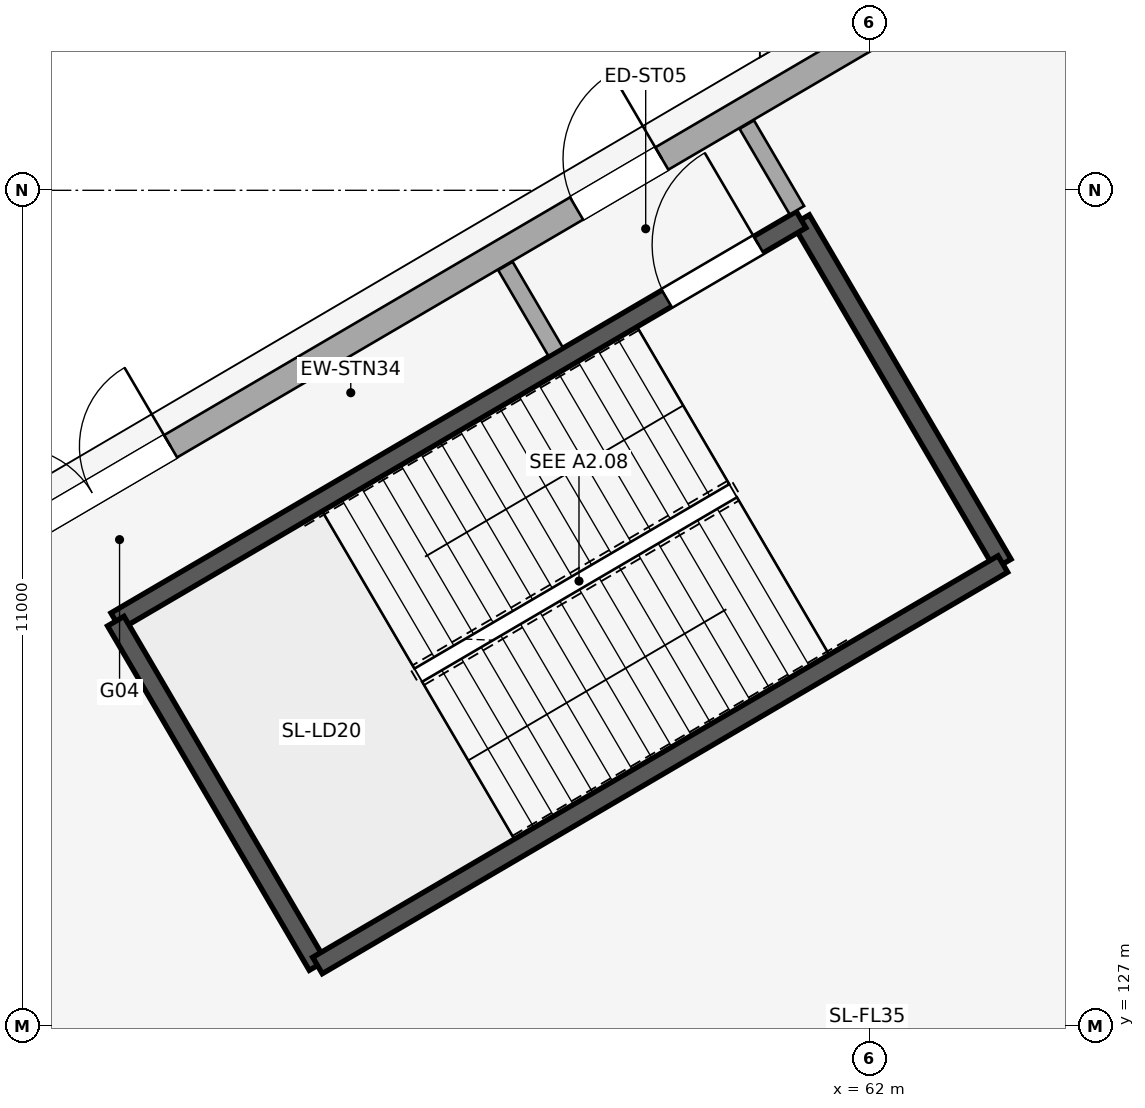
"""IFC4 building model, lengths in metres.
Left out: names, types, materials, properties, quantities, classifications, styles, units other than length and angle.
Written with IfcOpenShell. Run it as: python <this file> out.ifc"""

import sys

from ifc_helpers import new_model, si_unit, direction, frame, frame_2d, origin, place, context, subcontext, project, spatial, rectangle, extrude, element, fill, save


model = new_model("IFC4")
c1 = context("Model", 3, precision=1e-05, world=origin(), true_north=direction((0.0, 1.0)))
c2 = subcontext(c1, "Body", "Model", "MODEL_VIEW")
j1 = project(units=[si_unit("LENGTHUNIT", "METRE"), si_unit("PLANEANGLEUNIT", "RADIAN")], contexts=[c1])
p1 = place(None, origin())
s1 = spatial("IfcSite", under=j1, at=p1, CompositionType="ELEMENT")
p2 = place(p1, origin())
s2 = spatial("IfcBuilding", under=s1, at=p2, CompositionType="ELEMENT")
p3 = place(p2, origin())
s3 = spatial("IfcBuildingStorey", under=s2, at=p3, CompositionType="ELEMENT", Elevation=0.0)
p4 = place(p3, frame((64.103, 141.255, 0.0), z_axis=(0.0, 0.0, 1.0), x_axis=(-0.862843632099, -0.505470935413, 0.0)))
e1 = element("IfcWall", 1, at=p4, inside=s3, PredefinedType="STANDARD", context=c2, shape_type="SweptSolid", body=[
    extrude(rectangle(XDim=21.403, YDim=0.34, at=frame_2d((10.701, 0.0))), origin(), (0.0, 0.0, 1.0), 3.85),
])
p5 = place(p4, frame((5.613, 0.0, 0.0)))
e2 = element("IfcOpeningElement", 2, at=p5, cuts=e1, PredefinedType="OPENING", context=c2, shape_type="SweptSolid", body=[
    extrude(rectangle(XDim=1.3, YDim=2.2, at=frame_2d((0.65, 1.1))), frame((0.0, 0.18, 0.0), z_axis=(0.0, -1.0, 0.0), x_axis=(1.0, 0.0, 0.0)), (0.0, 0.0, 1.0), 0.36),
])
p6 = place(p4, frame((13.103, 0.0, 0.0)))
e3 = element("IfcOpeningElement", 3, at=p6, cuts=e1, PredefinedType="OPENING", context=c2, shape_type="SweptSolid", body=[
    extrude(rectangle(XDim=2.4, YDim=2.4, at=frame_2d((1.2, 1.2))), frame((0.0, 0.18, 0.0), z_axis=(0.0, -1.0, 0.0), x_axis=(1.0, 0.0, 0.0)), (0.0, 0.0, 1.0), 0.36),
])
p7 = place(p3, frame((63.747, 133.084, 0.0), z_axis=(0.0, 0.0, 1.0), x_axis=(-0.505460490551, 0.862849750821, 0.0)))
e4 = element("IfcWall", 4, at=p7, inside=s3, PredefinedType="SHEAR", context=c2, shape_type="SweptSolid", body=[
    extrude(rectangle(XDim=5.25, YDim=0.25, at=frame_2d((2.625, 0.0))), origin(), (0.0, 0.0, 1.0), 5.1),
])
p8 = place(p3, frame((61.093, 137.614, 0.0), z_axis=(0.0, 0.0, 1.0), x_axis=(-0.862854686184, -0.505452065513, 0.0)))
e5 = element("IfcWall", 5, at=p8, inside=s3, PredefinedType="SHEAR", context=c2, shape_type="SweptSolid", body=[
    extrude(rectangle(XDim=10.45, YDim=0.25, at=frame_2d((5.225, 0.0))), origin(), (0.0, 0.0, 1.0), 5.1),
])
p9 = place(p8, frame((0.65, 0.0, 0.0)))
e6 = element("IfcOpeningElement", 6, at=p9, cuts=e5, PredefinedType="OPENING", context=c2, shape_type="SweptSolid", body=[
    extrude(rectangle(XDim=1.4, YDim=2.2, at=frame_2d((0.7, 1.1))), frame((0.0, 0.135, 0.0), z_axis=(0.0, -1.0, 0.0), x_axis=(1.0, 0.0, 0.0)), (0.0, 0.0, 1.0), 0.27),
])
p10 = place(p3, frame((52.076, 132.332, 0.0), z_axis=(0.0, 0.0, 1.0), x_axis=(0.505474830399, -0.862841350327, 0.0)))
e7 = element("IfcWall", 7, at=p10, inside=s3, PredefinedType="SHEAR", context=c2, shape_type="SweptSolid", body=[
    extrude(rectangle(XDim=5.25, YDim=0.25, at=frame_2d((2.625, 0.0))), origin(), (0.0, 0.0, 1.0), 5.1),
])
p11 = place(p3, frame((54.73, 127.802, 0.0), z_axis=(0.0, 0.0, 1.0), x_axis=(0.862838527648, 0.505479648657, 0.0)))
e8 = element("IfcWall", 8, at=p11, inside=s3, PredefinedType="SHEAR", context=c2, shape_type="SweptSolid", body=[
    extrude(rectangle(XDim=10.45, YDim=0.25, at=frame_2d((5.225, 0.0))), origin(), (0.0, 0.0, 1.0), 5.1),
])
for number, where, z_axis, x_axis in (
    (9, (61.038, 137.738, 0.0), (0.0, 0.0, 1.0), (-0.505, 0.863, 0.0)),
    (10, (57.862, 135.878, 0.0), (0.0, 0.0, 1.0), (-0.505, 0.863, 0.0)),
):
    element("IfcWall", number, at=place(p3, frame(where, z_axis=z_axis, x_axis=x_axis)), inside=s3, PredefinedType="PARTITIONING", context=c2, shape_type="SweptSolid", body=[
        extrude(rectangle(XDim=1.306, YDim=0.22, at=frame_2d((0.653, 0.0))), origin(), (0.0, 0.0, 1.0), 3.69),
    ])
p12 = place(p3, frame((71.188, 129.579, 0.0), z_axis=(0.0, 0.0, 1.0), x_axis=(-0.849564585217, -0.527484611667, 0.0)))
e11 = element("IfcWall", 11, at=p12, inside=s3, PredefinedType="PARTITIONING", context=c2, shape_type="SweptSolid", body=[
    extrude(rectangle(XDim=18.818, YDim=0.16, at=frame_2d((9.409, 0.0))), origin(), (0.0, 0.0, 1.0), 3.69),
])
p13 = place(p5, frame((1.3, 0.0, 0.0), z_axis=(0.0, 0.0, 1.0), x_axis=(-1.0, 0.0, 0.0)))
e12 = element("IfcDoor", 12, at=p13, inside=s3, OperationType="SINGLE_SWING_RIGHT", PredefinedType="DOOR", context=c2, shape_type="SweptSolid", body=[
    extrude(rectangle(XDim=1.3, YDim=2.2, at=frame_2d((0.65, 1.1))), frame((0.0, 0.025, 0.0), z_axis=(0.0, -1.0, 0.0), x_axis=(1.0, 0.0, 0.0)), (0.0, 0.0, 1.0), 0.05),
])
fill(e2, e12)
p14 = place(p6, frame((2.4, 0.0, 0.0), z_axis=(0.0, 0.0, 1.0), x_axis=(-1.0, 0.0, 0.0)))
e13 = element("IfcDoor", 13, at=p14, inside=s3, OperationType="DOUBLE_DOOR_SINGLE_SWING", PredefinedType="DOOR", context=c2, shape_type="SweptSolid", body=[
    extrude(rectangle(XDim=2.4, YDim=2.4, at=frame_2d((1.2, 1.2))), frame((0.0, 0.025, 0.0), z_axis=(0.0, -1.0, 0.0), x_axis=(1.0, 0.0, 0.0)), (0.0, 0.0, 1.0), 0.05),
])
fill(e3, e13)
p15 = place(p9, frame((1.4, 0.0, 0.0), z_axis=(0.0, 0.0, 1.0), x_axis=(-1.0, 0.0, 0.0)))
e14 = element("IfcDoor", 14, at=p15, inside=s3, OperationType="SINGLE_SWING_RIGHT", PredefinedType="DOOR", context=c2, shape_type="SweptSolid", body=[
    extrude(rectangle(XDim=1.4, YDim=2.2, at=frame_2d((0.7, 1.1))), frame((0.0, 0.025, 0.0), z_axis=(0.0, -1.0, 0.0), x_axis=(1.0, 0.0, 0.0)), (0.0, 0.0, 1.0), 0.05),
])
fill(e6, e14)
save(model, sys.argv[1])
